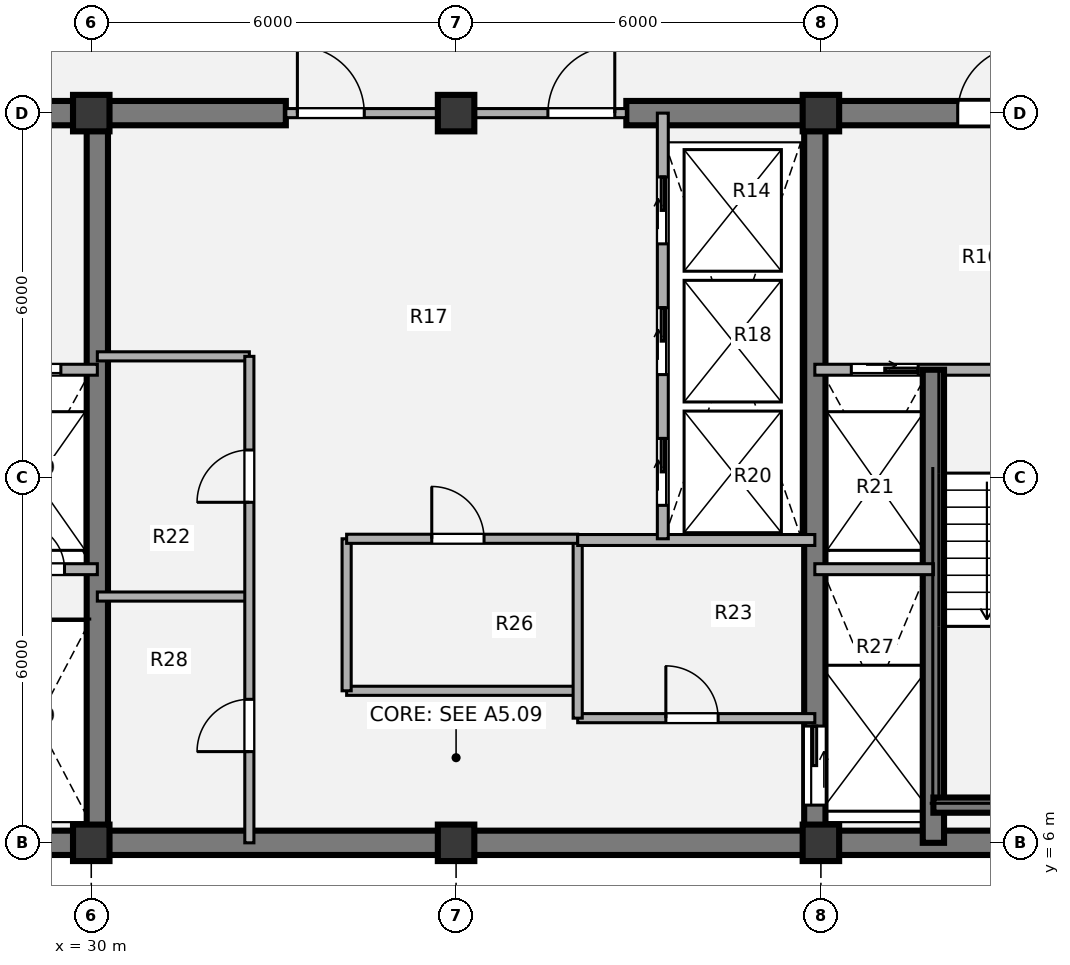
"""IFC4 building model, lengths in metres.
Left out: names, types, materials, properties, quantities, classifications, styles, units other than length and angle.
Written with IfcOpenShell. Run it as: python <this file> out.ifc"""

import sys

from ifc_helpers import new_model, si_unit, direction, frame, frame_2d, origin, origin_2d, place, context, subcontext, project, spatial, rectangle, extrude, source, transform, mapped, element, fill, save


model = new_model("IFC4")
c1 = context("Model", 3, precision=1e-05, world=origin(), true_north=direction((0.0, 1.0)))
c2 = subcontext(c1, "Body", "Model", "MODEL_VIEW")
j1 = project(units=[si_unit("LENGTHUNIT", "METRE"), si_unit("PLANEANGLEUNIT", "RADIAN")], contexts=[c1])
p1 = place(None, origin())
s1 = spatial("IfcSite", under=j1, at=p1, CompositionType="ELEMENT")
p2 = place(p1, origin())
s2 = spatial("IfcBuilding", under=s1, at=p2, CompositionType="ELEMENT")
p3 = place(p2, frame((0.0, 0.0, 279.72)))
s3 = spatial("IfcBuildingStorey", under=s2, at=p3, CompositionType="ELEMENT", Elevation=279.72)
m1 = source(origin(), c2, "Body", "SweptSolid", [
    extrude(rectangle(XDim=0.6, YDim=0.6, at=origin_2d()), origin(), (0.0, 0.0, 1.0), 3.78),
])
for number, where, z_axis, x_axis in (
    (1, (30.0, 6.0, 0.0), (0.0, 0.0, 1.0), (1.0, 0.0, 0.0)),
    (2, (36.0, 6.0, 0.0), (0.0, 0.0, 1.0), (1.0, 0.0, 0.0)),
    (3, (42.0, 6.0, 0.0), (0.0, 0.0, 1.0), (1.0, 0.0, 0.0)),
    (4, (30.0, 18.0, 0.0), (0.0, 0.0, 1.0), (1.0, 0.0, 0.0)),
    (5, (36.0, 18.0, 0.0), (0.0, 0.0, 1.0), (1.0, 0.0, 0.0)),
    (6, (42.0, 18.0, 0.0), (0.0, 0.0, 1.0), (1.0, 0.0, 0.0)),
):
    element("IfcColumn", number, at=place(p3, frame(where, z_axis=z_axis, x_axis=x_axis)), inside=s3, PredefinedType="COLUMN", context=c2, shape_type="MappedRepresentation", body=[
        mapped(m1, transform((0.0, 0.0, 0.0), x_axis=(1.0, 0.0, 0.0), y_axis=(0.0, 1.0, 0.0), z_axis=(0.0, 0.0, 1.0), scale=1.0)),
    ])
p4 = place(p3, frame((48.2, 6.0, 0.0), z_axis=(0.0, 0.0, 1.0), x_axis=(-1.0, 0.0, 0.0)))
e7 = element("IfcWall", 7, at=p4, inside=s3, PredefinedType="SHEAR", context=c2, shape_type="SweptSolid", body=[
    extrude(rectangle(XDim=24.4, YDim=0.4, at=frame_2d((12.2, 0.0))), origin(), (0.0, 0.0, 1.0), 3.78),
])
p5 = place(p3, frame((23.8, 18.0, 0.0), z_axis=(0.0, 0.0, 1.0), x_axis=(1.0, 0.0, 0.0)))
e8 = element("IfcWall", 8, at=p5, inside=s3, PredefinedType="SHEAR", context=c2, shape_type="SweptSolid", body=[
    extrude(rectangle(XDim=9.4, YDim=0.4, at=frame_2d((4.7, 0.0))), origin(), (0.0, 0.0, 1.0), 3.78),
])
p6 = place(p5, frame((2.95, 0.0, 0.0)))
e9 = element("IfcOpeningElement", 9, at=p6, cuts=e8, PredefinedType="OPENING", context=c2, shape_type="SweptSolid", body=[
    extrude(rectangle(XDim=1.1, YDim=2.1, at=origin_2d()), frame((0.55, 0.21, 1.05), z_axis=(0.0, -1.0, 0.0), x_axis=(1.0, 0.0, 0.0)), (0.0, 0.0, 1.0), 0.42),
])
p7 = place(p3, frame((38.8, 18.0, 0.0), z_axis=(0.0, 0.0, 1.0), x_axis=(1.0, 0.0, 0.0)))
e10 = element("IfcWall", 10, at=p7, inside=s3, PredefinedType="SHEAR", context=c2, shape_type="SweptSolid", body=[
    extrude(rectangle(XDim=9.4, YDim=0.4, at=frame_2d((4.7, 0.0))), origin(), (0.0, 0.0, 1.0), 3.78),
])
p8 = place(p7, frame((5.45, 0.0, 0.0)))
e11 = element("IfcOpeningElement", 11, at=p8, cuts=e10, PredefinedType="OPENING", context=c2, shape_type="SweptSolid", body=[
    extrude(rectangle(XDim=1.1, YDim=2.1, at=origin_2d()), frame((0.55, 0.21, 1.05), z_axis=(0.0, -1.0, 0.0), x_axis=(1.0, 0.0, 0.0)), (0.0, 0.0, 1.0), 0.42),
])
p9 = place(p3, frame((30.1, 6.0, 0.0), z_axis=(0.0, 0.0, 1.0), x_axis=(0.0, 1.0, 0.0)))
e12 = element("IfcWall", 12, at=p9, inside=s3, PredefinedType="SHEAR", context=c2, shape_type="SweptSolid", body=[
    extrude(rectangle(XDim=12.0, YDim=0.35, at=frame_2d((6.0, 0.0))), origin(), (0.0, 0.0, 1.0), 3.78),
])
p10 = place(p3, frame((41.9, 18.0, 0.0), z_axis=(0.0, 0.0, 1.0), x_axis=(0.0, -1.0, 0.0)))
e13 = element("IfcWall", 13, at=p10, inside=s3, PredefinedType="SHEAR", context=c2, shape_type="SweptSolid", body=[
    extrude(rectangle(XDim=12.0, YDim=0.35, at=frame_2d((6.0, 0.0))), origin(), (0.0, 0.0, 1.0), 3.78),
])
p11 = place(p10, frame((10.08, 0.0, 0.0)))
e14 = element("IfcOpeningElement", 14, at=p11, cuts=e13, PredefinedType="OPENING", context=c2, shape_type="SweptSolid", body=[
    extrude(rectangle(XDim=1.3, YDim=2.1, at=origin_2d()), frame((0.65, 0.185, 1.05), z_axis=(0.0, -1.0, 0.0), x_axis=(1.0, 0.0, 0.0)), (0.0, 0.0, 1.0), 0.37),
])
p12 = place(p3, frame((30.1, 14.0, 0.0), z_axis=(0.0, 0.0, 1.0), x_axis=(1.0, 0.0, 0.0)))
e15 = element("IfcWall", 15, at=p12, inside=s3, PredefinedType="PARTITIONING", context=c2, shape_type="SweptSolid", body=[
    extrude(rectangle(XDim=2.5, YDim=0.15, at=frame_2d((1.25, 0.0))), origin(), (0.0, 0.0, 1.0), 3.5),
])
p13 = place(p3, frame((34.2, 8.5, 0.0), z_axis=(0.0, 0.0, 1.0), x_axis=(1.0, 0.0, 0.0)))
e16 = element("IfcWall", 16, at=p13, inside=s3, PredefinedType="PARTITIONING", context=c2, shape_type="SweptSolid", body=[
    extrude(rectangle(XDim=3.8, YDim=0.15, at=frame_2d((1.9, 0.0))), origin(), (0.0, 0.0, 1.0), 3.5),
])
p14 = place(p3, frame((38.0, 8.05, 0.0), z_axis=(0.0, 0.0, 1.0), x_axis=(1.0, 0.0, 0.0)))
e17 = element("IfcWall", 17, at=p14, inside=s3, PredefinedType="PARTITIONING", context=c2, shape_type="SweptSolid", body=[
    extrude(rectangle(XDim=3.9, YDim=0.15, at=frame_2d((1.95, 0.0))), origin(), (0.0, 0.0, 1.0), 3.5),
])
p15 = place(p14, frame((1.45, 0.0, 0.0)))
e18 = element("IfcOpeningElement", 18, at=p15, cuts=e17, PredefinedType="OPENING", context=c2, shape_type="SweptSolid", body=[
    extrude(rectangle(XDim=0.86, YDim=2.1, at=origin_2d()), frame((0.43, 0.085, 1.05), z_axis=(0.0, -1.0, 0.0), x_axis=(1.0, 0.0, 0.0)), (0.0, 0.0, 1.0), 0.17),
])
p16 = place(p3, frame((34.2, 8.5, 0.0), z_axis=(0.0, 0.0, 1.0), x_axis=(0.0, 1.0, 0.0)))
e19 = element("IfcWall", 19, at=p16, inside=s3, PredefinedType="PARTITIONING", context=c2, shape_type="SweptSolid", body=[
    extrude(rectangle(XDim=2.5, YDim=0.15, at=frame_2d((1.25, 0.0))), origin(), (0.0, 0.0, 1.0), 3.5),
])
p17 = place(p3, frame((38.0, 8.05, 0.0), z_axis=(0.0, 0.0, 1.0), x_axis=(0.0, 1.0, 0.0)))
e20 = element("IfcWall", 20, at=p17, inside=s3, PredefinedType="PARTITIONING", context=c2, shape_type="SweptSolid", body=[
    extrude(rectangle(XDim=2.95, YDim=0.15, at=frame_2d((1.475, 0.0))), origin(), (0.0, 0.0, 1.0), 3.5),
])
p18 = place(p3, frame((34.2, 11.0, 0.0), z_axis=(0.0, 0.0, 1.0), x_axis=(1.0, 0.0, 0.0)))
e21 = element("IfcWall", 21, at=p18, inside=s3, PredefinedType="PARTITIONING", context=c2, shape_type="SweptSolid", body=[
    extrude(rectangle(XDim=3.8, YDim=0.15, at=frame_2d((1.9, 0.0))), origin(), (0.0, 0.0, 1.0), 3.5),
])
p19 = place(p18, frame((1.4, 0.0, 0.0)))
e22 = element("IfcOpeningElement", 22, at=p19, cuts=e21, PredefinedType="OPENING", context=c2, shape_type="SweptSolid", body=[
    extrude(rectangle(XDim=0.86, YDim=2.1, at=origin_2d()), frame((0.43, 0.085, 1.05), z_axis=(0.0, -1.0, 0.0), x_axis=(1.0, 0.0, 0.0)), (0.0, 0.0, 1.0), 0.17),
])
p20 = place(p3, frame((38.0, 10.98, 0.0), z_axis=(0.0, 0.0, 1.0), x_axis=(1.0, 0.0, 0.0)))
e23 = element("IfcWall", 23, at=p20, inside=s3, PredefinedType="PARTITIONING", context=c2, shape_type="SweptSolid", body=[
    extrude(rectangle(XDim=3.9, YDim=0.18, at=frame_2d((1.95, 0.0))), origin(), (0.0, 0.0, 1.0), 3.5),
])
p21 = place(p3, frame((30.1, 10.05, 0.0), z_axis=(0.0, 0.0, 1.0), x_axis=(1.0, 0.0, 0.0)))
e24 = element("IfcWall", 24, at=p21, inside=s3, PredefinedType="PARTITIONING", context=c2, shape_type="SweptSolid", body=[
    extrude(rectangle(XDim=2.5, YDim=0.15, at=frame_2d((1.25, 0.0))), origin(), (0.0, 0.0, 1.0), 3.5),
])
p22 = place(p3, frame((32.6, 6.0, 0.0), z_axis=(0.0, 0.0, 1.0), x_axis=(0.0, 1.0, 0.0)))
e25 = element("IfcWall", 25, at=p22, inside=s3, PredefinedType="PARTITIONING", context=c2, shape_type="SweptSolid", body=[
    extrude(rectangle(XDim=8.0, YDim=0.15, at=frame_2d((4.0, 0.0))), origin(), (0.0, 0.0, 1.0), 3.5),
])
p23 = place(p22, frame((1.5, 0.0, 0.0)))
e26 = element("IfcOpeningElement", 26, at=p23, cuts=e25, PredefinedType="OPENING", context=c2, shape_type="SweptSolid", body=[
    extrude(rectangle(XDim=0.86, YDim=2.1, at=origin_2d()), frame((0.43, 0.085, 1.05), z_axis=(0.0, -1.0, 0.0), x_axis=(1.0, 0.0, 0.0)), (0.0, 0.0, 1.0), 0.17),
])
p24 = place(p22, frame((5.6, 0.0, 0.0)))
e27 = element("IfcOpeningElement", 27, at=p24, cuts=e25, PredefinedType="OPENING", context=c2, shape_type="SweptSolid", body=[
    extrude(rectangle(XDim=0.86, YDim=2.1, at=origin_2d()), frame((0.43, 0.085, 1.05), z_axis=(0.0, -1.0, 0.0), x_axis=(1.0, 0.0, 0.0)), (0.0, 0.0, 1.0), 0.17),
])
p25 = place(p3, frame((33.2, 18.0, 0.0), z_axis=(0.0, 0.0, 1.0), x_axis=(1.0, 0.0, 0.0)))
e28 = element("IfcWall", 28, at=p25, inside=s3, PredefinedType="PARTITIONING", context=c2, shape_type="SweptSolid", body=[
    extrude(rectangle(XDim=5.6, YDim=0.15, at=frame_2d((2.8, 0.0))), origin(), (0.0, 0.0, 1.0), 2.515),
])
p26 = place(p25, frame((0.19, 0.0, 0.0)))
e29 = element("IfcOpeningElement", 29, at=p26, cuts=e28, PredefinedType="OPENING", context=c2, shape_type="SweptSolid", body=[
    extrude(rectangle(XDim=1.1, YDim=2.1, at=origin_2d()), frame((0.55, 0.085, 1.05), z_axis=(0.0, -1.0, 0.0), x_axis=(1.0, 0.0, 0.0)), (0.0, 0.0, 1.0), 0.17),
])
p27 = place(p25, frame((4.31, 0.0, 0.0)))
e30 = element("IfcOpeningElement", 30, at=p27, cuts=e28, PredefinedType="OPENING", context=c2, shape_type="SweptSolid", body=[
    extrude(rectangle(XDim=1.1, YDim=2.1, at=origin_2d()), frame((0.55, 0.085, 1.05), z_axis=(0.0, -1.0, 0.0), x_axis=(1.0, 0.0, 0.0)), (0.0, 0.0, 1.0), 0.17),
])
p28 = place(p3, frame((24.0, 13.78, 0.0), z_axis=(0.0, 0.0, 1.0), x_axis=(1.0, 0.0, 0.0)))
e31 = element("IfcWall", 31, at=p28, inside=s3, PredefinedType="PARTITIONING", context=c2, shape_type="SweptSolid", body=[
    extrude(rectangle(XDim=6.1, YDim=0.18, at=frame_2d((3.05, 0.0))), origin(), (0.0, 0.0, 1.0), 3.5),
])
p29 = place(p28, frame((1.15, 0.0, 0.0)))
e32 = element("IfcOpeningElement", 32, at=p29, cuts=e31, PredefinedType="OPENING", context=c2, shape_type="SweptSolid", body=[
    extrude(rectangle(XDim=1.1, YDim=2.1, at=origin_2d()), frame((0.55, 0.1, 1.05), z_axis=(0.0, -1.0, 0.0), x_axis=(1.0, 0.0, 0.0)), (0.0, 0.0, 1.0), 0.2),
])
p30 = place(p28, frame((4.4, 0.0, 0.0)))
e33 = element("IfcOpeningElement", 33, at=p30, cuts=e31, PredefinedType="OPENING", context=c2, shape_type="SweptSolid", body=[
    extrude(rectangle(XDim=1.1, YDim=2.1, at=origin_2d()), frame((0.55, 0.1, 1.05), z_axis=(0.0, -1.0, 0.0), x_axis=(1.0, 0.0, 0.0)), (0.0, 0.0, 1.0), 0.2),
])
p31 = place(p3, frame((28.15, 10.5, 0.0), z_axis=(0.0, 0.0, 1.0), x_axis=(1.0, 0.0, 0.0)))
e34 = element("IfcWall", 34, at=p31, inside=s3, PredefinedType="PARTITIONING", context=c2, shape_type="SweptSolid", body=[
    extrude(rectangle(XDim=1.95, YDim=0.18, at=frame_2d((0.975, 0.0))), origin(), (0.0, 0.0, 1.0), 3.5),
])
p32 = place(p31, frame((0.65, 0.0, 0.0)))
e35 = element("IfcOpeningElement", 35, at=p32, cuts=e34, PredefinedType="OPENING", context=c2, shape_type="SweptSolid", body=[
    extrude(rectangle(XDim=0.76, YDim=2.05, at=origin_2d()), frame((0.38, 0.1, 1.025), z_axis=(0.0, -1.0, 0.0), x_axis=(1.0, 0.0, 0.0)), (0.0, 0.0, 1.0), 0.2),
])
p33 = place(p3, frame((41.9, 13.78, 0.0), z_axis=(0.0, 0.0, 1.0), x_axis=(1.0, 0.0, 0.0)))
e36 = element("IfcWall", 36, at=p33, inside=s3, PredefinedType="PARTITIONING", context=c2, shape_type="SweptSolid", body=[
    extrude(rectangle(XDim=6.1, YDim=0.18, at=frame_2d((3.05, 0.0))), origin(), (0.0, 0.0, 1.0), 3.5),
])
p34 = place(p33, frame((0.6, 0.0, 0.0)))
e37 = element("IfcOpeningElement", 37, at=p34, cuts=e36, PredefinedType="OPENING", context=c2, shape_type="SweptSolid", body=[
    extrude(rectangle(XDim=1.1, YDim=2.1, at=origin_2d()), frame((0.55, 0.1, 1.05), z_axis=(0.0, -1.0, 0.0), x_axis=(1.0, 0.0, 0.0)), (0.0, 0.0, 1.0), 0.2),
])
p35 = place(p33, frame((3.8, 0.0, 0.0)))
e38 = element("IfcOpeningElement", 38, at=p35, cuts=e36, PredefinedType="OPENING", context=c2, shape_type="SweptSolid", body=[
    extrude(rectangle(XDim=1.1, YDim=2.1, at=origin_2d()), frame((0.55, 0.1, 1.05), z_axis=(0.0, -1.0, 0.0), x_axis=(1.0, 0.0, 0.0)), (0.0, 0.0, 1.0), 0.2),
])
p36 = place(p3, frame((43.85, 6.0, 0.0), z_axis=(0.0, 0.0, 1.0), x_axis=(0.0, 1.0, 0.0)))
e39 = element("IfcWall", 39, at=p36, inside=s3, PredefinedType="SHEAR", context=c2, shape_type="SweptSolid", body=[
    extrude(rectangle(XDim=7.78, YDim=0.35, at=frame_2d((3.89, 0.0))), origin(), (0.0, 0.0, 1.0), 3.85),
])
p37 = place(p3, frame((43.85, 6.62, 0.0), z_axis=(0.0, 0.0, 1.0), x_axis=(1.0, 0.0, 0.0)))
e40 = element("IfcWall", 40, at=p37, inside=s3, PredefinedType="SHEAR", context=c2, shape_type="SweptSolid", body=[
    extrude(rectangle(XDim=3.57, YDim=0.25, at=frame_2d((1.785, 0.0))), origin(), (0.0, 0.0, 1.0), 3.85),
])
p38 = place(p3, frame((41.9, 10.5, 0.0), z_axis=(0.0, 0.0, 1.0), x_axis=(1.0, 0.0, 0.0)))
e41 = element("IfcWall", 41, at=p38, inside=s3, PredefinedType="PARTITIONING", context=c2, shape_type="SweptSolid", body=[
    extrude(rectangle(XDim=1.95, YDim=0.18, at=frame_2d((0.975, 0.0))), origin(), (0.0, 0.0, 1.0), 3.5),
])
p39 = place(p3, frame((39.4, 11.0, 0.0), z_axis=(0.0, 0.0, 1.0), x_axis=(0.0, 1.0, 0.0)))
e42 = element("IfcWall", 42, at=p39, inside=s3, PredefinedType="PARTITIONING", context=c2, shape_type="SweptSolid", body=[
    extrude(rectangle(XDim=7.0, YDim=0.18, at=frame_2d((3.5, 0.0))), origin(), (0.0, 0.0, 1.0), 3.5),
])
p40 = place(p39, frame((0.55, 0.0, 0.0)))
e43 = element("IfcOpeningElement", 43, at=p40, cuts=e42, PredefinedType="OPENING", context=c2, shape_type="SweptSolid", body=[
    extrude(rectangle(XDim=1.1, YDim=2.1, at=origin_2d()), frame((0.55, 0.1, 1.05), z_axis=(0.0, -1.0, 0.0), x_axis=(1.0, 0.0, 0.0)), (0.0, 0.0, 1.0), 0.2),
])
p41 = place(p39, frame((2.7, 0.0, 0.0)))
e44 = element("IfcOpeningElement", 44, at=p41, cuts=e42, PredefinedType="OPENING", context=c2, shape_type="SweptSolid", body=[
    extrude(rectangle(XDim=1.1, YDim=2.1, at=origin_2d()), frame((0.55, 0.1, 1.05), z_axis=(0.0, -1.0, 0.0), x_axis=(1.0, 0.0, 0.0)), (0.0, 0.0, 1.0), 0.2),
])
p42 = place(p39, frame((4.85, 0.0, 0.0)))
e45 = element("IfcOpeningElement", 45, at=p42, cuts=e42, PredefinedType="OPENING", context=c2, shape_type="SweptSolid", body=[
    extrude(rectangle(XDim=1.1, YDim=2.1, at=origin_2d()), frame((0.55, 0.1, 1.05), z_axis=(0.0, -1.0, 0.0), x_axis=(1.0, 0.0, 0.0)), (0.0, 0.0, 1.0), 0.2),
])
m2 = source(origin(), c2, "Body", "SweptSolid", [
    extrude(rectangle(XDim=0.86, YDim=2.1, at=origin_2d()), frame((0.43, 0.025, 1.05), z_axis=(0.0, -1.0, 0.0), x_axis=(1.0, 0.0, 0.0)), (0.0, 0.0, 1.0), 0.05),
])
p43 = place(p15, origin())
e46 = element("IfcDoor", 46, at=p43, inside=s3, OperationType="SINGLE_SWING_LEFT", PredefinedType="DOOR", context=c2, shape_type="MappedRepresentation", body=[
    mapped(m2, transform((0.0, 0.0, 0.0), x_axis=(1.0, 0.0, 0.0), y_axis=(0.0, 1.0, 0.0), z_axis=(0.0, 0.0, 1.0), scale=1.0)),
])
fill(e18, e46)
p44 = place(p19, origin())
e47 = element("IfcDoor", 47, at=p44, inside=s3, OperationType="SINGLE_SWING_LEFT", PredefinedType="DOOR", context=c2, shape_type="MappedRepresentation", body=[
    mapped(m2, transform((0.0, 0.0, 0.0), x_axis=(1.0, 0.0, 0.0), y_axis=(0.0, 1.0, 0.0), z_axis=(0.0, 0.0, 1.0), scale=1.0)),
])
fill(e22, e47)
p45 = place(p23, origin())
e48 = element("IfcDoor", 48, at=p45, inside=s3, OperationType="SINGLE_SWING_LEFT", PredefinedType="DOOR", context=c2, shape_type="MappedRepresentation", body=[
    mapped(m2, transform((0.0, 0.0, 0.0), x_axis=(1.0, 0.0, 0.0), y_axis=(0.0, 1.0, 0.0), z_axis=(0.0, 0.0, 1.0), scale=1.0)),
])
fill(e26, e48)
p46 = place(p24, origin())
e49 = element("IfcDoor", 49, at=p46, inside=s3, OperationType="SINGLE_SWING_LEFT", PredefinedType="DOOR", context=c2, shape_type="MappedRepresentation", body=[
    mapped(m2, transform((0.0, 0.0, 0.0), x_axis=(1.0, 0.0, 0.0), y_axis=(0.0, 1.0, 0.0), z_axis=(0.0, 0.0, 1.0), scale=1.0)),
])
fill(e27, e49)
m3 = source(origin(), c2, "Body", "SweptSolid", [
    extrude(rectangle(XDim=1.1, YDim=2.1, at=origin_2d()), frame((0.55, 0.025, 1.05), z_axis=(0.0, -1.0, 0.0), x_axis=(1.0, 0.0, 0.0)), (0.0, 0.0, 1.0), 0.05),
])
p47 = place(p26, origin())
e50 = element("IfcDoor", 50, at=p47, inside=s3, OperationType="SINGLE_SWING_LEFT", PredefinedType="DOOR", context=c2, shape_type="MappedRepresentation", body=[
    mapped(m3, transform((0.0, 0.0, 0.0), x_axis=(1.0, 0.0, 0.0), y_axis=(0.0, 1.0, 0.0), z_axis=(0.0, 0.0, 1.0), scale=1.0)),
])
fill(e29, e50)
p48 = place(p27, origin())
e51 = element("IfcDoor", 51, at=p48, inside=s3, OperationType="SINGLE_SWING_RIGHT", PredefinedType="DOOR", context=c2, shape_type="MappedRepresentation", body=[
    mapped(m3, transform((0.0, 0.0, 0.0), x_axis=(1.0, 0.0, 0.0), y_axis=(0.0, 1.0, 0.0), z_axis=(0.0, 0.0, 1.0), scale=1.0)),
])
fill(e30, e51)
m4 = source(origin(), c2, "Body", "SweptSolid", [
    extrude(rectangle(XDim=1.1, YDim=2.1, at=origin_2d()), frame((0.55, 0.025, 1.05), z_axis=(0.0, -1.0, 0.0), x_axis=(1.0, 0.0, 0.0)), (0.0, 0.0, 1.0), 0.05),
])
p49 = place(p30, origin())
e52 = element("IfcDoor", 52, at=p49, inside=s3, OperationType="SLIDING_TO_LEFT", PredefinedType="DOOR", context=c2, shape_type="MappedRepresentation", body=[
    mapped(m4, transform((0.0, 0.0, 0.0), x_axis=(1.0, 0.0, 0.0), y_axis=(0.0, 1.0, 0.0), z_axis=(0.0, 0.0, 1.0), scale=1.0)),
])
fill(e33, e52)
m5 = source(origin(), c2, "Body", "SweptSolid", [
    extrude(rectangle(XDim=0.76, YDim=2.05, at=origin_2d()), frame((0.38, 0.025, 1.025), z_axis=(0.0, -1.0, 0.0), x_axis=(1.0, 0.0, 0.0)), (0.0, 0.0, 1.0), 0.05),
])
p50 = place(p32, origin())
e53 = element("IfcDoor", 53, at=p50, inside=s3, OperationType="SINGLE_SWING_LEFT", PredefinedType="DOOR", context=c2, shape_type="MappedRepresentation", body=[
    mapped(m5, transform((0.0, 0.0, 0.0), x_axis=(1.0, 0.0, 0.0), y_axis=(0.0, 1.0, 0.0), z_axis=(0.0, 0.0, 1.0), scale=1.0)),
])
fill(e35, e53)
p51 = place(p34, origin())
e54 = element("IfcDoor", 54, at=p51, inside=s3, OperationType="SLIDING_TO_RIGHT", PredefinedType="DOOR", context=c2, shape_type="MappedRepresentation", body=[
    mapped(m4, transform((0.0, 0.0, 0.0), x_axis=(1.0, 0.0, 0.0), y_axis=(0.0, 1.0, 0.0), z_axis=(0.0, 0.0, 1.0), scale=1.0)),
])
fill(e37, e54)
m6 = source(origin(), c2, "Body", "SweptSolid", [
    extrude(rectangle(XDim=1.3, YDim=2.1, at=origin_2d()), frame((0.65, 0.025, 1.05), z_axis=(0.0, -1.0, 0.0), x_axis=(1.0, 0.0, 0.0)), (0.0, 0.0, 1.0), 0.05),
])
p52 = place(p11, origin())
e55 = element("IfcDoor", 55, at=p52, inside=s3, OperationType="SLIDING_TO_LEFT", PredefinedType="DOOR", context=c2, shape_type="MappedRepresentation", body=[
    mapped(m6, transform((0.0, 0.0, 0.0), x_axis=(1.0, 0.0, 0.0), y_axis=(0.0, 1.0, 0.0), z_axis=(0.0, 0.0, 1.0), scale=1.0)),
])
fill(e14, e55)
p53 = place(p8, origin())
e56 = element("IfcDoor", 56, at=p53, inside=s3, OperationType="SINGLE_SWING_RIGHT", PredefinedType="DOOR", context=c2, shape_type="MappedRepresentation", body=[
    mapped(m3, transform((0.0, 0.0, 0.0), x_axis=(1.0, 0.0, 0.0), y_axis=(0.0, 1.0, 0.0), z_axis=(0.0, 0.0, 1.0), scale=1.0)),
])
fill(e11, e56)
p54 = place(p40, origin())
e57 = element("IfcDoor", 57, at=p54, inside=s3, OperationType="SLIDING_TO_RIGHT", PredefinedType="DOOR", context=c2, shape_type="MappedRepresentation", body=[
    mapped(m4, transform((0.0, 0.0, 0.0), x_axis=(1.0, 0.0, 0.0), y_axis=(0.0, 1.0, 0.0), z_axis=(0.0, 0.0, 1.0), scale=1.0)),
])
fill(e43, e57)
p55 = place(p41, origin())
e58 = element("IfcDoor", 58, at=p55, inside=s3, OperationType="SLIDING_TO_RIGHT", PredefinedType="DOOR", context=c2, shape_type="MappedRepresentation", body=[
    mapped(m4, transform((0.0, 0.0, 0.0), x_axis=(1.0, 0.0, 0.0), y_axis=(0.0, 1.0, 0.0), z_axis=(0.0, 0.0, 1.0), scale=1.0)),
])
fill(e44, e58)
p56 = place(p42, origin())
e59 = element("IfcDoor", 59, at=p56, inside=s3, OperationType="SLIDING_TO_RIGHT", PredefinedType="DOOR", context=c2, shape_type="MappedRepresentation", body=[
    mapped(m4, transform((0.0, 0.0, 0.0), x_axis=(1.0, 0.0, 0.0), y_axis=(0.0, 1.0, 0.0), z_axis=(0.0, 0.0, 1.0), scale=1.0)),
])
fill(e45, e59)
save(model, sys.argv[1])
